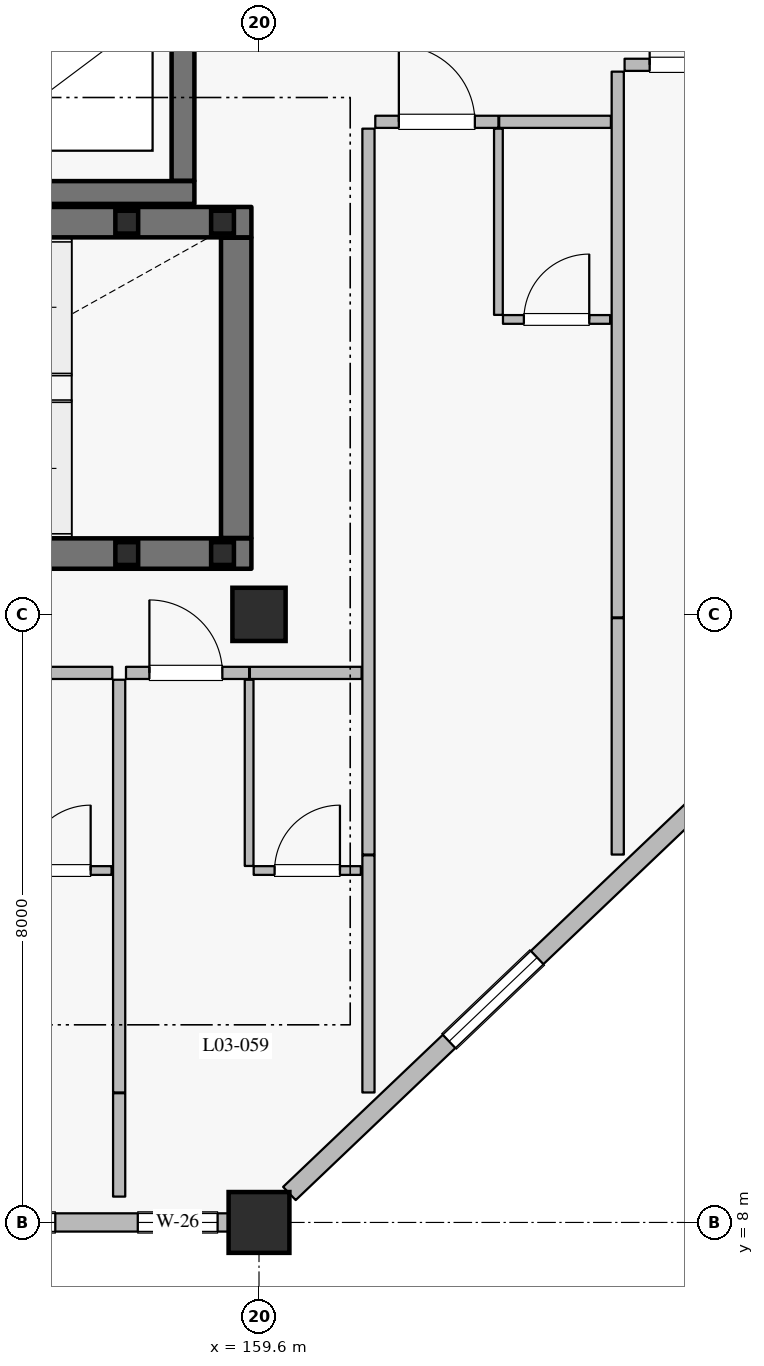
"""IFC4 building model, lengths in metres.
Left out: names, types, materials, properties, quantities, classifications, styles, units other than length and angle.
Written with IfcOpenShell. Run it as: python <this file> out.ifc"""

import sys

from ifc_helpers import new_model, si_unit, direction, frame, frame_2d, origin, origin_2d, place, context, subcontext, project, spatial, rectangle, hollow_rectangle, extrude, element, fill, save


model = new_model("IFC4")
c1 = context("Model", 3, precision=1e-05, world=origin(), true_north=direction((0.0, 1.0)))
c2 = subcontext(c1, "Body", "Model", "MODEL_VIEW")
j1 = project(units=[si_unit("LENGTHUNIT", "METRE"), si_unit("PLANEANGLEUNIT", "RADIAN")], contexts=[c1])
p1 = place(None, origin())
s1 = spatial("IfcSite", under=j1, at=p1, CompositionType="ELEMENT")
p2 = place(p1, origin())
s2 = spatial("IfcBuilding", under=s1, at=p2, CompositionType="ELEMENT")
p3 = place(p2, frame((0.0, 0.0, 16.2)))
s3 = spatial("IfcBuildingStorey", under=s2, at=p3, CompositionType="ELEMENT", Elevation=16.2)
p4 = place(p3, frame((159.6, 8.0, 0.0), z_axis=(0.0, 0.0, 1.0), x_axis=(1.0, 0.0, 0.0)))
e1 = element("IfcColumn", 1, at=p4, inside=s3, PredefinedType="COLUMN", context=c2, shape_type="SweptSolid", body=[
    extrude(rectangle(XDim=0.8, YDim=0.8, at=origin_2d()), origin(), (0.0, 0.0, 1.0), 4.8),
])
p5 = place(p3, frame((159.6, 16.0, 0.0), z_axis=(0.0, 0.0, 1.0), x_axis=(1.0, 0.0, 0.0)))
e2 = element("IfcColumn", 2, at=p5, inside=s3, PredefinedType="COLUMN", context=c2, shape_type="SweptSolid", body=[
    extrude(rectangle(XDim=0.7, YDim=0.7, at=origin_2d()), origin(), (0.0, 0.0, 1.0), 4.8),
])
p6 = place(p3, frame((159.2, 8.0, 0.0), z_axis=(0.0, 0.0, 1.0), x_axis=(-1.0, 0.0, 0.0)))
e3 = element("IfcWall", 3, at=p6, inside=s3, PredefinedType="SOLIDWALL", context=c2, shape_type="SweptSolid", body=[
    extrude(rectangle(XDim=7.6, YDim=0.24, at=frame_2d((3.8, 0.0))), origin(), (0.0, 0.0, 1.0), 4.13),
])
p7 = place(p6, frame((0.145, 0.0, 0.8)))
e4 = element("IfcOpeningElement", 4, at=p7, cuts=e3, PredefinedType="OPENING", context=c2, shape_type="SweptSolid", body=[
    extrude(rectangle(XDim=1.05, YDim=1.65, at=frame_2d((0.525, 0.825))), frame((0.0, 0.13, 0.0), z_axis=(0.0, -1.0, 0.0), x_axis=(1.0, 0.0, 0.0)), (0.0, 0.0, 1.0), 0.26),
])
p8 = place(p6, frame((2.28, 0.0, 0.8)))
e5 = element("IfcOpeningElement", 5, at=p8, cuts=e3, PredefinedType="OPENING", context=c2, shape_type="SweptSolid", body=[
    extrude(rectangle(XDim=1.6, YDim=1.6, at=frame_2d((0.8, 0.8))), frame((0.0, 0.13, 0.0), z_axis=(0.0, -1.0, 0.0), x_axis=(1.0, 0.0, 0.0)), (0.0, 0.0, 1.0), 0.26),
])
p9 = place(p6, frame((5.41, 0.0, 0.8)))
e6 = element("IfcOpeningElement", 6, at=p9, cuts=e3, PredefinedType="OPENING", context=c2, shape_type="SweptSolid", body=[
    extrude(rectangle(XDim=1.6, YDim=1.6, at=frame_2d((0.8, 0.8))), frame((0.0, 0.13, 0.0), z_axis=(0.0, -1.0, 0.0), x_axis=(1.0, 0.0, 0.0)), (0.0, 0.0, 1.0), 0.26),
])
p10 = place(p3, frame((167.6, 15.619, 0.0), z_axis=(0.0, 0.0, 1.0), x_axis=(-0.724156739794, -0.689635422677, 0.0)))
e7 = element("IfcWall", 7, at=p10, inside=s3, PredefinedType="SOLIDWALL", context=c2, shape_type="SweptSolid", body=[
    extrude(rectangle(XDim=10.495, YDim=0.24, at=frame_2d((5.248, 0.0))), origin(), (0.0, 0.0, 1.0), 4.13),
])
p11 = place(p10, frame((1.465, 0.0, 0.8)))
e8 = element("IfcOpeningElement", 8, at=p11, cuts=e7, PredefinedType="OPENING", context=c2, shape_type="SweptSolid", body=[
    extrude(rectangle(XDim=1.6, YDim=1.6, at=frame_2d((0.8, 0.8))), frame((0.0, 0.13, 0.0), z_axis=(0.0, -1.0, 0.0), x_axis=(1.0, 0.0, 0.0)), (0.0, 0.0, 1.0), 0.26),
])
p12 = place(p10, frame((5.994, 0.0, 0.8)))
e9 = element("IfcOpeningElement", 9, at=p12, cuts=e7, PredefinedType="OPENING", context=c2, shape_type="SweptSolid", body=[
    extrude(rectangle(XDim=1.6, YDim=1.6, at=frame_2d((0.8, 0.8))), frame((0.0, 0.13, 0.0), z_axis=(0.0, -1.0, 0.0), x_axis=(1.0, 0.0, 0.0)), (0.0, 0.0, 1.0), 0.26),
])
p13 = place(p3, frame((155.25, 21.55, 0.0), z_axis=(0.0, 0.0, 1.0), x_axis=(1.0, 0.0, 0.0)))
e10 = element("IfcWall", 10, at=p13, inside=s3, PredefinedType="SHEAR", context=c2, shape_type="SweptSolid", body=[
    extrude(rectangle(XDim=3.5, YDim=0.3, at=frame_2d((1.75, 0.0))), origin(), (0.0, 0.0, 1.0), 4.535),
])
p14 = place(p3, frame((158.6, 21.705, 0.0), z_axis=(0.0, 0.0, 1.0), x_axis=(0.0, 1.0, 0.0)))
e11 = element("IfcWall", 11, at=p14, inside=s3, PredefinedType="SHEAR", context=c2, shape_type="SweptSolid", body=[
    extrude(rectangle(XDim=2.59, YDim=0.3, at=frame_2d((1.295, 0.0))), origin(), (0.0, 0.0, 1.0), 4.535),
])
p15 = place(p3, frame((151.3, 16.8, 0.0), z_axis=(0.0, 0.0, 1.0), x_axis=(1.0, 0.0, 0.0)))
e12 = element("IfcWall", 12, at=p15, inside=s3, PredefinedType="SHEAR", context=c2, shape_type="SweptSolid", body=[
    extrude(rectangle(XDim=8.2, YDim=0.4, at=frame_2d((4.1, 0.0))), origin(), (0.0, 0.0, 1.0), 4.535),
])
p16 = place(p3, frame((159.3, 17.005, 0.0), z_axis=(0.0, 0.0, 1.0), x_axis=(0.0, 1.0, 0.0)))
e13 = element("IfcWall", 13, at=p16, inside=s3, PredefinedType="SHEAR", context=c2, shape_type="SweptSolid", body=[
    extrude(rectangle(XDim=3.95, YDim=0.4, at=frame_2d((1.975, 0.0))), origin(), (0.0, 0.0, 1.0), 4.535),
])
p17 = place(p3, frame((151.3, 21.16, 0.0), z_axis=(0.0, 0.0, 1.0), x_axis=(1.0, 0.0, 0.0)))
e14 = element("IfcWall", 14, at=p17, inside=s3, PredefinedType="SHEAR", context=c2, shape_type="SweptSolid", body=[
    extrude(rectangle(XDim=8.2, YDim=0.4, at=frame_2d((4.1, 0.0))), origin(), (0.0, 0.0, 1.0), 4.535),
])
p18 = place(p17, frame((0.43, 0.0, 0.0)))
e15 = element("IfcOpeningElement", 15, at=p18, cuts=e14, PredefinedType="OPENING", context=c2, shape_type="SweptSolid", body=[
    extrude(rectangle(XDim=1.16, YDim=2.2, at=frame_2d((0.58, 1.1))), frame((0.0, 0.21, 0.0), z_axis=(0.0, -1.0, 0.0), x_axis=(1.0, 0.0, 0.0)), (0.0, 0.0, 1.0), 0.42),
])
for number, where, z_axis, x_axis in (
    (16, (157.86, 16.8, -2.4), (0.0, 0.0, 1.0), (1.0, 0.0, 0.0)),
    (17, (157.86, 21.16, -2.4), (0.0, 0.0, 1.0), (1.0, 0.0, 0.0)),
    (18, (159.12, 16.8, -2.4), (0.0, 0.0, 1.0), (1.0, 0.0, 0.0)),
    (19, (159.12, 21.16, -2.4), (0.0, 0.0, 1.0), (1.0, 0.0, 0.0)),
):
    element("IfcColumn", number, at=place(p3, frame(where, z_axis=z_axis, x_axis=x_axis)), inside=s3, PredefinedType="COLUMN", context=c2, shape_type="SweptSolid", body=[
        extrude(hollow_rectangle(XDim=0.3, YDim=0.3, WallThickness=0.012, at=origin_2d()), origin(), (0.0, 0.0, 1.0), 4.62),
    ])
p19 = place(p3, frame((156.2, 15.23, 0.0), z_axis=(0.0, 0.0, 1.0), x_axis=(1.0, 0.0, 0.0)))
e20 = element("IfcWall", 20, at=p19, inside=s3, PredefinedType="PARTITIONING", context=c2, shape_type="SweptSolid", body=[
    extrude(rectangle(XDim=1.47, YDim=0.16, at=frame_2d((0.735, 0.0))), origin(), (0.0, 0.0, 1.0), 4.535),
])
p20 = place(p3, frame((156.25, 12.63, 0.0), z_axis=(0.0, 0.0, 1.0), x_axis=(1.0, 0.0, 0.0)))
e21 = element("IfcWall", 21, at=p20, inside=s3, PredefinedType="PARTITIONING", context=c2, shape_type="SweptSolid", body=[
    extrude(rectangle(XDim=1.41, YDim=0.115, at=frame_2d((0.705, 0.0))), origin(), (0.0, 0.0, 1.0), 4.535),
])
p21 = place(p20, frame((0.275, 0.0, 0.0)))
e22 = element("IfcOpeningElement", 22, at=p21, cuts=e21, PredefinedType="OPENING", context=c2, shape_type="SweptSolid", body=[
    extrude(rectangle(XDim=0.86, YDim=2.12, at=frame_2d((0.43, 1.06))), frame((0.0, 0.067, 0.0), z_axis=(0.0, -1.0, 0.0), x_axis=(1.0, 0.0, 0.0)), (0.0, 0.0, 1.0), 0.135),
])
p22 = place(p3, frame((157.76, 8.34, 0.0), z_axis=(0.0, 0.0, 1.0), x_axis=(0.0, 1.0, 0.0)))
e23 = element("IfcWall", 23, at=p22, inside=s3, PredefinedType="PARTITIONING", context=c2, shape_type="SweptSolid", body=[
    extrude(rectangle(XDim=1.36, YDim=0.16, at=frame_2d((0.68, 0.0))), origin(), (0.0, 0.0, 1.0), 4.535),
])
p23 = place(p3, frame((157.85, 15.23, 0.0), z_axis=(0.0, 0.0, 1.0), x_axis=(1.0, 0.0, 0.0)))
e24 = element("IfcWall", 24, at=p23, inside=s3, PredefinedType="PARTITIONING", context=c2, shape_type="SweptSolid", body=[
    extrude(rectangle(XDim=1.62, YDim=0.16, at=frame_2d((0.81, 0.0))), origin(), (0.0, 0.0, 1.0), 4.535),
])
p24 = place(p23, frame((0.308, 0.0, 0.0)))
e25 = element("IfcOpeningElement", 25, at=p24, cuts=e24, PredefinedType="OPENING", context=c2, shape_type="SweptSolid", body=[
    extrude(rectangle(XDim=0.96, YDim=2.2, at=frame_2d((0.48, 1.1))), frame((0.0, 0.09, 0.0), z_axis=(0.0, -1.0, 0.0), x_axis=(1.0, 0.0, 0.0)), (0.0, 0.0, 1.0), 0.18),
])
p25 = place(p3, frame((159.48, 15.23, 0.0), z_axis=(0.0, 0.0, 1.0), x_axis=(1.0, 0.0, 0.0)))
e26 = element("IfcWall", 26, at=p25, inside=s3, PredefinedType="PARTITIONING", context=c2, shape_type="SweptSolid", body=[
    extrude(rectangle(XDim=1.47, YDim=0.16, at=frame_2d((0.735, 0.0))), origin(), (0.0, 0.0, 1.0), 4.535),
])
p26 = place(p3, frame((159.47, 12.69, 0.0), z_axis=(0.0, 0.0, 1.0), x_axis=(0.0, 1.0, 0.0)))
e27 = element("IfcWall", 27, at=p26, inside=s3, PredefinedType="PARTITIONING", context=c2, shape_type="SweptSolid", body=[
    extrude(rectangle(XDim=2.45, YDim=0.115, at=frame_2d((1.225, 0.0))), origin(), (0.0, 0.0, 1.0), 4.535),
])
p27 = place(p3, frame((159.53, 12.63, 0.0), z_axis=(0.0, 0.0, 1.0), x_axis=(1.0, 0.0, 0.0)))
e28 = element("IfcWall", 28, at=p27, inside=s3, PredefinedType="PARTITIONING", context=c2, shape_type="SweptSolid", body=[
    extrude(rectangle(XDim=1.41, YDim=0.115, at=frame_2d((0.705, 0.0))), origin(), (0.0, 0.0, 1.0), 4.535),
])
p28 = place(p27, frame((0.275, 0.0, 0.0)))
e29 = element("IfcOpeningElement", 29, at=p28, cuts=e28, PredefinedType="OPENING", context=c2, shape_type="SweptSolid", body=[
    extrude(rectangle(XDim=0.86, YDim=2.12, at=frame_2d((0.43, 1.06))), frame((0.0, 0.067, 0.0), z_axis=(0.0, -1.0, 0.0), x_axis=(1.0, 0.0, 0.0)), (0.0, 0.0, 1.0), 0.135),
])
p29 = place(p3, frame((157.76, 9.71, 0.0), z_axis=(0.0, 0.0, 1.0), x_axis=(0.0, 1.0, 0.0)))
e30 = element("IfcWall", 30, at=p29, inside=s3, PredefinedType="PARTITIONING", context=c2, shape_type="SweptSolid", body=[
    extrude(rectangle(XDim=5.43, YDim=0.16, at=frame_2d((2.715, 0.0))), origin(), (0.0, 0.0, 1.0), 4.535),
])
p30 = place(p3, frame((161.04, 9.71, 0.0), z_axis=(0.0, 0.0, 1.0), x_axis=(0.0, 1.0, 0.0)))
e31 = element("IfcWall", 31, at=p30, inside=s3, PredefinedType="PARTITIONING", context=c2, shape_type="SweptSolid", body=[
    extrude(rectangle(XDim=3.12, YDim=0.16, at=frame_2d((1.56, 0.0))), origin(), (0.0, 0.0, 1.0), 4.535),
])
p31 = place(p3, frame((161.13, 22.48, 0.0), z_axis=(0.0, 0.0, 1.0), x_axis=(1.0, 0.0, 0.0)))
e32 = element("IfcWall", 32, at=p31, inside=s3, PredefinedType="PARTITIONING", context=c2, shape_type="SweptSolid", body=[
    extrude(rectangle(XDim=1.62, YDim=0.16, at=frame_2d((0.81, 0.0))), origin(), (0.0, 0.0, 1.0), 4.535),
])
p32 = place(p31, frame((0.31, 0.0, 0.0)))
e33 = element("IfcOpeningElement", 33, at=p32, cuts=e32, PredefinedType="OPENING", context=c2, shape_type="SweptSolid", body=[
    extrude(rectangle(XDim=1.0, YDim=2.25, at=frame_2d((0.5, 1.125))), frame((0.0, 0.09, 0.0), z_axis=(0.0, -1.0, 0.0), x_axis=(1.0, 0.0, 0.0)), (0.0, 0.0, 1.0), 0.18),
])
p33 = place(p3, frame((162.76, 22.48, 0.0), z_axis=(0.0, 0.0, 1.0), x_axis=(1.0, 0.0, 0.0)))
e34 = element("IfcWall", 34, at=p33, inside=s3, PredefinedType="PARTITIONING", context=c2, shape_type="SweptSolid", body=[
    extrude(rectangle(XDim=1.47, YDim=0.16, at=frame_2d((0.735, 0.0))), origin(), (0.0, 0.0, 1.0), 4.535),
])
p34 = place(p3, frame((162.75, 19.94, 0.0), z_axis=(0.0, 0.0, 1.0), x_axis=(0.0, 1.0, 0.0)))
e35 = element("IfcWall", 35, at=p34, inside=s3, PredefinedType="PARTITIONING", context=c2, shape_type="SweptSolid", body=[
    extrude(rectangle(XDim=2.45, YDim=0.115, at=frame_2d((1.225, 0.0))), origin(), (0.0, 0.0, 1.0), 4.535),
])
p35 = place(p3, frame((162.81, 19.88, 0.0), z_axis=(0.0, 0.0, 1.0), x_axis=(1.0, 0.0, 0.0)))
e36 = element("IfcWall", 36, at=p35, inside=s3, PredefinedType="PARTITIONING", context=c2, shape_type="SweptSolid", body=[
    extrude(rectangle(XDim=1.41, YDim=0.115, at=frame_2d((0.705, 0.0))), origin(), (0.0, 0.0, 1.0), 4.535),
])
p36 = place(p35, frame((0.275, 0.0, 0.0)))
e37 = element("IfcOpeningElement", 37, at=p36, cuts=e36, PredefinedType="OPENING", context=c2, shape_type="SweptSolid", body=[
    extrude(rectangle(XDim=0.86, YDim=2.12, at=frame_2d((0.43, 1.06))), frame((0.0, 0.067, 0.0), z_axis=(0.0, -1.0, 0.0), x_axis=(1.0, 0.0, 0.0)), (0.0, 0.0, 1.0), 0.135),
])
p37 = place(p3, frame((161.04, 12.84, 0.0), z_axis=(0.0, 0.0, 1.0), x_axis=(0.0, 1.0, 0.0)))
e38 = element("IfcWall", 38, at=p37, inside=s3, PredefinedType="PARTITIONING", context=c2, shape_type="SweptSolid", body=[
    extrude(rectangle(XDim=9.55, YDim=0.16, at=frame_2d((4.775, 0.0))), origin(), (0.0, 0.0, 1.0), 4.535),
])
p38 = place(p3, frame((164.32, 12.84, 0.0), z_axis=(0.0, 0.0, 1.0), x_axis=(0.0, 1.0, 0.0)))
e39 = element("IfcWall", 39, at=p38, inside=s3, PredefinedType="PARTITIONING", context=c2, shape_type="SweptSolid", body=[
    extrude(rectangle(XDim=3.11, YDim=0.16, at=frame_2d((1.555, 0.0))), origin(), (0.0, 0.0, 1.0), 4.535),
])
p39 = place(p3, frame((164.41, 23.23, 0.0), z_axis=(0.0, 0.0, 1.0), x_axis=(1.0, 0.0, 0.0)))
e40 = element("IfcWall", 40, at=p39, inside=s3, PredefinedType="PARTITIONING", context=c2, shape_type="SweptSolid", body=[
    extrude(rectangle(XDim=1.62, YDim=0.16, at=frame_2d((0.81, 0.0))), origin(), (0.0, 0.0, 1.0), 4.535),
])
p40 = place(p39, frame((0.33, 0.0, 0.0)))
e41 = element("IfcOpeningElement", 41, at=p40, cuts=e40, PredefinedType="OPENING", context=c2, shape_type="SweptSolid", body=[
    extrude(rectangle(XDim=0.96, YDim=2.2, at=frame_2d((0.48, 1.1))), frame((0.0, 0.09, 0.0), z_axis=(0.0, -1.0, 0.0), x_axis=(1.0, 0.0, 0.0)), (0.0, 0.0, 1.0), 0.18),
])
p41 = place(p3, frame((164.32, 15.96, 0.0), z_axis=(0.0, 0.0, 1.0), x_axis=(0.0, 1.0, 0.0)))
e42 = element("IfcWall", 42, at=p41, inside=s3, PredefinedType="PARTITIONING", context=c2, shape_type="SweptSolid", body=[
    extrude(rectangle(XDim=7.18, YDim=0.16, at=frame_2d((3.59, 0.0))), origin(), (0.0, 0.0, 1.0), 4.535),
])
p42 = place(p7, origin())
e43 = element("IfcWindow", 43, at=p42, inside=s3, PartitioningType="SINGLE_PANEL", PredefinedType="WINDOW", context=c2, shape_type="SweptSolid", body=[
    extrude(rectangle(XDim=1.05, YDim=1.65, at=frame_2d((0.525, 0.825))), frame((0.0, 0.03, 0.0), z_axis=(0.0, -1.0, 0.0), x_axis=(1.0, 0.0, 0.0)), (0.0, 0.0, 1.0), 0.06),
])
fill(e4, e43)
p43 = place(p8, origin())
e44 = element("IfcWindow", 44, at=p43, inside=s3, PartitioningType="SINGLE_PANEL", PredefinedType="WINDOW", context=c2, shape_type="SweptSolid", body=[
    extrude(rectangle(XDim=1.6, YDim=1.6, at=frame_2d((0.8, 0.8))), frame((0.0, 0.03, 0.0), z_axis=(0.0, -1.0, 0.0), x_axis=(1.0, 0.0, 0.0)), (0.0, 0.0, 1.0), 0.06),
])
fill(e5, e44)
p44 = place(p12, origin())
e45 = element("IfcWindow", 45, at=p44, inside=s3, PartitioningType="SINGLE_PANEL", PredefinedType="WINDOW", context=c2, shape_type="SweptSolid", body=[
    extrude(rectangle(XDim=1.6, YDim=1.6, at=frame_2d((0.8, 0.8))), frame((0.0, 0.03, 0.0), z_axis=(0.0, -1.0, 0.0), x_axis=(1.0, 0.0, 0.0)), (0.0, 0.0, 1.0), 0.06),
])
fill(e9, e45)
p45 = place(p21, origin())
e46 = element("IfcDoor", 46, at=p45, inside=s3, OperationType="SINGLE_SWING_RIGHT", PredefinedType="DOOR", context=c2, shape_type="SweptSolid", body=[
    extrude(rectangle(XDim=0.86, YDim=2.12, at=frame_2d((0.43, 1.06))), frame((0.0, 0.025, 0.0), z_axis=(0.0, -1.0, 0.0), x_axis=(1.0, 0.0, 0.0)), (0.0, 0.0, 1.0), 0.05),
])
fill(e22, e46)
p46 = place(p24, origin())
e47 = element("IfcDoor", 47, at=p46, inside=s3, OperationType="SINGLE_SWING_LEFT", PredefinedType="DOOR", context=c2, shape_type="SweptSolid", body=[
    extrude(rectangle(XDim=0.96, YDim=2.2, at=frame_2d((0.48, 1.1))), frame((0.0, 0.025, 0.0), z_axis=(0.0, -1.0, 0.0), x_axis=(1.0, 0.0, 0.0)), (0.0, 0.0, 1.0), 0.05),
])
fill(e25, e47)
p47 = place(p28, origin())
e48 = element("IfcDoor", 48, at=p47, inside=s3, OperationType="SINGLE_SWING_RIGHT", PredefinedType="DOOR", context=c2, shape_type="SweptSolid", body=[
    extrude(rectangle(XDim=0.86, YDim=2.12, at=frame_2d((0.43, 1.06))), frame((0.0, 0.025, 0.0), z_axis=(0.0, -1.0, 0.0), x_axis=(1.0, 0.0, 0.0)), (0.0, 0.0, 1.0), 0.05),
])
fill(e29, e48)
p48 = place(p32, origin())
e49 = element("IfcDoor", 49, at=p48, inside=s3, OperationType="SINGLE_SWING_LEFT", PredefinedType="DOOR", context=c2, shape_type="SweptSolid", body=[
    extrude(rectangle(XDim=1.0, YDim=2.25, at=frame_2d((0.5, 1.125))), frame((0.0, 0.025, 0.0), z_axis=(0.0, -1.0, 0.0), x_axis=(1.0, 0.0, 0.0)), (0.0, 0.0, 1.0), 0.05),
])
fill(e33, e49)
p49 = place(p36, origin())
e50 = element("IfcDoor", 50, at=p49, inside=s3, OperationType="SINGLE_SWING_RIGHT", PredefinedType="DOOR", context=c2, shape_type="SweptSolid", body=[
    extrude(rectangle(XDim=0.86, YDim=2.12, at=frame_2d((0.43, 1.06))), frame((0.0, 0.025, 0.0), z_axis=(0.0, -1.0, 0.0), x_axis=(1.0, 0.0, 0.0)), (0.0, 0.0, 1.0), 0.05),
])
fill(e37, e50)
p50 = place(p40, origin())
e51 = element("IfcDoor", 51, at=p50, inside=s3, OperationType="SINGLE_SWING_LEFT", PredefinedType="DOOR", context=c2, shape_type="SweptSolid", body=[
    extrude(rectangle(XDim=0.96, YDim=2.2, at=frame_2d((0.48, 1.1))), frame((0.0, 0.025, 0.0), z_axis=(0.0, -1.0, 0.0), x_axis=(1.0, 0.0, 0.0)), (0.0, 0.0, 1.0), 0.05),
])
fill(e41, e51)
save(model, sys.argv[1])
